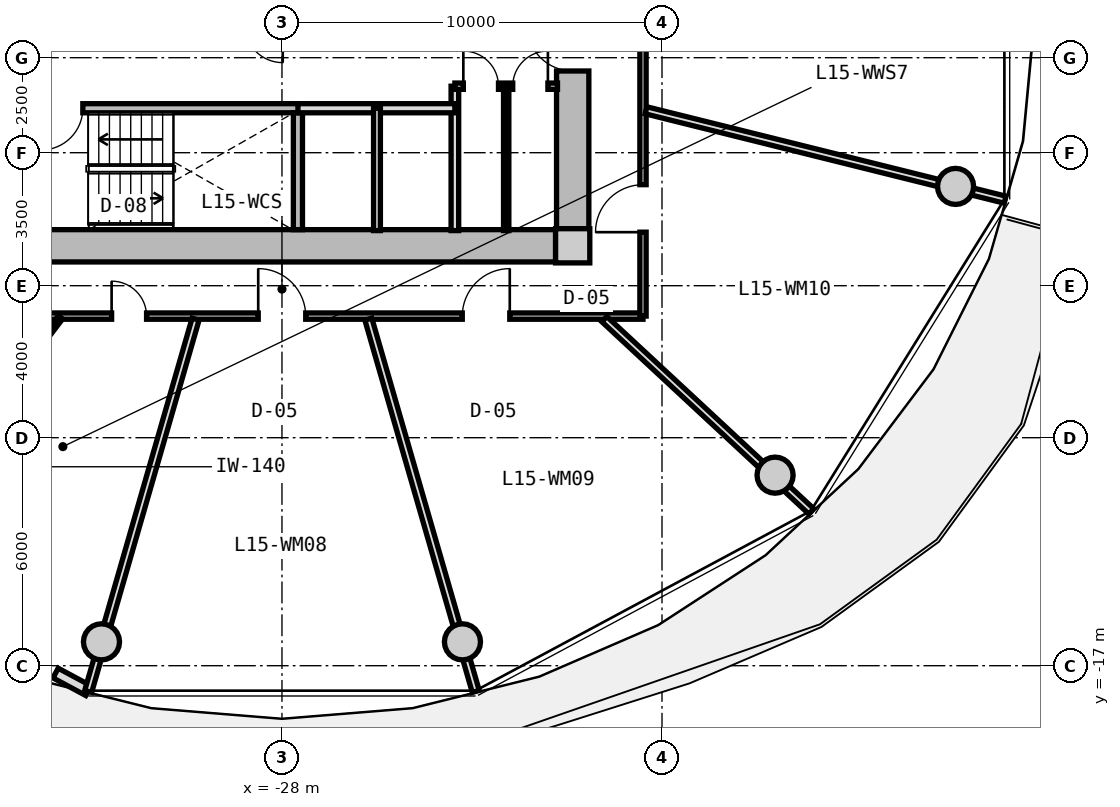
"""IFC4 building model, lengths in metres.
Left out: names, types, materials, properties, quantities, classifications, styles, units other than length and angle.
Written with IfcOpenShell. Run it as: python <this file> out.ifc"""

import sys

from ifc_helpers import new_model, si_unit, direction, frame, frame_2d, origin, origin_2d, place, context, subcontext, project, spatial, rectangle, circle, extrude, source, transform, mapped, element, fill, save


model = new_model("IFC4")
c1 = context("Model", 3, precision=1e-05, world=origin(), true_north=direction((0.0, 1.0)))
c2 = subcontext(c1, "Body", "Model", "MODEL_VIEW")
j1 = project(units=[si_unit("LENGTHUNIT", "METRE"), si_unit("PLANEANGLEUNIT", "RADIAN")], contexts=[c1])
p1 = place(None, origin())
s1 = spatial("IfcSite", under=j1, at=p1, CompositionType="ELEMENT")
p2 = place(p1, origin())
s2 = spatial("IfcBuilding", under=s1, at=p2, CompositionType="ELEMENT")
p3 = place(p2, frame((0.0, 0.0, 52.1)))
s3 = spatial("IfcBuildingStorey", under=s2, at=p3, CompositionType="ELEMENT", Elevation=52.1)
m1 = source(origin(), c2, "Body", "SweptSolid", [
    extrude(rectangle(XDim=0.9, YDim=0.9, at=origin_2d()), origin(), (0.0, 0.0, 1.0), 3.05),
])
p4 = place(p3, frame((-20.35, -5.95, 0.0), z_axis=(0.0, 0.0, 1.0), x_axis=(1.0, 0.0, 0.0)))
e1 = element("IfcColumn", 1, at=p4, inside=s3, PredefinedType="COLUMN", context=c2, shape_type="MappedRepresentation", body=[
    mapped(m1, transform((0.0, 0.0, 0.0), x_axis=(1.0, 0.0, 0.0), y_axis=(0.0, 1.0, 0.0), z_axis=(0.0, 0.0, 1.0), scale=1.0)),
])
m2 = source(origin(), c2, "Body", "SweptSolid", [
    extrude(rectangle(XDim=14.4, YDim=0.85, at=frame_2d((7.2, 0.0))), origin(), (0.0, 0.0, 1.0), 2.79),
])
p5 = place(p3, frame((-20.8, -5.95, 0.0), z_axis=(0.0, 0.0, 1.0), x_axis=(-1.0, 0.0, 0.0)))
e2 = element("IfcWall", 2, at=p5, inside=s3, PredefinedType="SHEAR", context=c2, shape_type="MappedRepresentation", body=[
    mapped(m2, transform((0.0, 0.0, 0.0), x_axis=(1.0, 0.0, 0.0), y_axis=(0.0, 1.0, 0.0), z_axis=(0.0, 0.0, 1.0), scale=1.0)),
])
m3 = source(origin(), c2, "Body", "SweptSolid", [
    extrude(rectangle(XDim=11.0, YDim=0.85, at=frame_2d((5.5, 0.0))), origin(), (0.0, 0.0, 1.0), 2.79),
])
p6 = place(p3, frame((-20.35, 5.5, 0.0), z_axis=(0.0, 0.0, 1.0), x_axis=(0.0, -1.0, 0.0)))
e3 = element("IfcWall", 3, at=p6, inside=s3, PredefinedType="SHEAR", context=c2, shape_type="MappedRepresentation", body=[
    mapped(m3, transform((0.0, 0.0, 0.0), x_axis=(1.0, 0.0, 0.0), y_axis=(0.0, 1.0, 0.0), z_axis=(0.0, 0.0, 1.0), scale=1.0)),
])
p7 = place(p6, frame((5.65, 0.0, 0.0)))
e4 = element("IfcOpeningElement", 4, at=p7, cuts=e3, PredefinedType="OPENING", context=c2, shape_type="SweptSolid", body=[
    extrude(rectangle(XDim=1.2, YDim=2.15, at=frame_2d((0.6, 1.075))), frame((0.0, 0.435, 0.0), z_axis=(0.0, -1.0, 0.0), x_axis=(1.0, 0.0, 0.0)), (0.0, 0.0, 1.0), 0.87),
])
m4 = source(origin(), c2, "Body", "SweptSolid", [
    extrude(circle(Radius=0.475, at=origin_2d()), origin(), (0.0, 0.0, 1.0), 3.05),
])
for number, where, z_axis, x_axis in (
    (5, (-32.749, -16.373, 0.0), (0.0, 0.0, 1.0), (1.0, 0.0, 0.0)),
    (6, (-23.251, -16.373, 0.0), (0.0, 0.0, 1.0), (1.0, 0.0, 0.0)),
    (7, (-15.025, -11.985, 0.0), (0.0, 0.0, 1.0), (1.0, 0.0, 0.0)),
    (8, (-10.275, -4.387, 0.0), (0.0, 0.0, 1.0), (1.0, 0.0, 0.0)),
):
    element("IfcColumn", number, at=place(p3, frame(where, z_axis=z_axis, x_axis=x_axis)), inside=s3, PredefinedType="COLUMN", context=c2, shape_type="MappedRepresentation", body=[
        mapped(m4, transform((0.0, 0.0, 0.0), x_axis=(1.0, 0.0, 0.0), y_axis=(0.0, 1.0, 0.0), z_axis=(0.0, 0.0, 1.0), scale=1.0)),
    ])
m5 = source(origin(), c2, "Body", "SweptSolid", [
    extrude(rectangle(XDim=10.011, YDim=0.29, at=frame_2d((5.005, 0.0))), origin(), (0.0, 0.0, 1.0), 2.79),
])
p8 = place(p3, frame((-33.094, -17.657, 0.0), z_axis=(0.0, 0.0, 1.0), x_axis=(-0.881272505317, 0.472608475773, 0.0)))
e9 = element("IfcWall", 9, at=p8, inside=s3, PredefinedType="SOLIDWALL", context=c2, shape_type="MappedRepresentation", body=[
    mapped(m5, transform((0.0, 0.0, 0.0), x_axis=(1.0, 0.0, 0.0), y_axis=(0.0, 1.0, 0.0), z_axis=(0.0, 0.0, 1.0), scale=1.0)),
])
p9 = place(p8, frame((0.98, 0.0, 0.0)))
e10 = element("IfcOpeningElement", 10, at=p9, cuts=e9, PredefinedType="OPENING", context=c2, shape_type="SweptSolid", body=[
    extrude(rectangle(XDim=1.15, YDim=2.25, at=frame_2d((0.575, 1.125))), frame((0.0, 0.155, 0.0), z_axis=(0.0, -1.0, 0.0), x_axis=(1.0, 0.0, 0.0)), (0.0, 0.0, 1.0), 0.31),
])
p10 = place(p8, frame((6.975, 0.0, 0.85)))
e11 = element("IfcOpeningElement", 11, at=p10, cuts=e9, PredefinedType="OPENING", context=c2, shape_type="SweptSolid", body=[
    extrude(rectangle(XDim=1.2, YDim=1.5, at=frame_2d((0.6, 0.75))), frame((0.0, 0.155, 0.0), z_axis=(0.0, -1.0, 0.0), x_axis=(1.0, 0.0, 0.0)), (0.0, 0.0, 1.0), 0.31),
])
m6 = source(origin(), c2, "Body", "SweptSolid", [
    extrude(rectangle(XDim=7.765, YDim=0.24, at=frame_2d((3.883, 0.0))), origin(), (0.0, 0.0, 1.0), 2.79),
])
p11 = place(p3, frame((-35.225, -2.33, 0.0), z_axis=(0.0, 0.0, 1.0), x_axis=(1.0, 0.0, 0.0)))
e12 = element("IfcWall", 12, at=p11, inside=s3, PredefinedType="PARTITIONING", context=c2, shape_type="MappedRepresentation", body=[
    mapped(m6, transform((0.0, 0.0, 0.0), x_axis=(1.0, 0.0, 0.0), y_axis=(0.0, 1.0, 0.0), z_axis=(0.0, 0.0, 1.0), scale=1.0)),
])
p12 = place(p11, frame((0.885, 0.0, 0.0)))
e13 = element("IfcOpeningElement", 13, at=p12, cuts=e12, PredefinedType="OPENING", context=c2, shape_type="SweptSolid", body=[
    extrude(rectangle(XDim=1.1, YDim=2.15, at=frame_2d((0.55, 1.075))), frame((0.0, 0.13, 0.0), z_axis=(0.0, -1.0, 0.0), x_axis=(1.0, 0.0, 0.0)), (0.0, 0.0, 1.0), 0.26),
])
m7 = source(origin(), c2, "Body", "SweptSolid", [
    extrude(rectangle(XDim=3.075, YDim=0.24, at=frame_2d((1.538, 0.0))), origin(), (0.0, 0.0, 1.0), 2.79),
])
p13 = place(p3, frame((-27.58, -5.525, 0.0), z_axis=(0.0, 0.0, 1.0), x_axis=(0.0, 1.0, 0.0)))
e14 = element("IfcWall", 14, at=p13, inside=s3, PredefinedType="PARTITIONING", context=c2, shape_type="MappedRepresentation", body=[
    mapped(m7, transform((0.0, 0.0, 0.0), x_axis=(1.0, 0.0, 0.0), y_axis=(0.0, 1.0, 0.0), z_axis=(0.0, 0.0, 1.0), scale=1.0)),
])
m8 = source(origin(), c2, "Body", "SweptSolid", [
    extrude(rectangle(XDim=3.8, YDim=0.2, at=frame_2d((1.9, 0.0))), origin(), (0.0, 0.0, 1.0), 2.775),
])
p14 = place(p3, frame((-23.45, -5.55, 0.0), z_axis=(0.0, 0.0, 1.0), x_axis=(0.0, 1.0, 0.0)))
e15 = element("IfcWall", 15, at=p14, inside=s3, PredefinedType="PARTITIONING", context=c2, shape_type="MappedRepresentation", body=[
    mapped(m8, transform((0.0, 0.0, 0.0), x_axis=(1.0, 0.0, 0.0), y_axis=(0.0, 1.0, 0.0), z_axis=(0.0, 0.0, 1.0), scale=1.0)),
])
m9 = source(origin(), c2, "Body", "SweptSolid", [
    extrude(rectangle(XDim=4.13, YDim=0.24, at=frame_2d((2.065, 0.0))), origin(), (0.0, 0.0, 1.0), 2.775),
])
p15 = place(p3, frame((-27.58, -2.33, 0.0), z_axis=(0.0, 0.0, 1.0), x_axis=(1.0, 0.0, 0.0)))
e16 = element("IfcWall", 16, at=p15, inside=s3, PredefinedType="PARTITIONING", context=c2, shape_type="MappedRepresentation", body=[
    mapped(m9, transform((0.0, 0.0, 0.0), x_axis=(1.0, 0.0, 0.0), y_axis=(0.0, 1.0, 0.0), z_axis=(0.0, 0.0, 1.0), scale=1.0)),
])
m10 = source(origin(), c2, "Body", "SweptSolid", [
    extrude(rectangle(XDim=3.22, YDim=0.18, at=frame_2d((1.61, 0.0))), origin(), (0.0, 0.0, 1.0), 2.775),
])
p16 = place(p3, frame((-25.5, -5.55, 0.0), z_axis=(0.0, 0.0, 1.0), x_axis=(0.0, 1.0, 0.0)))
e17 = element("IfcWall", 17, at=p16, inside=s3, PredefinedType="PARTITIONING", context=c2, shape_type="MappedRepresentation", body=[
    mapped(m10, transform((0.0, 0.0, 0.0), x_axis=(1.0, 0.0, 0.0), y_axis=(0.0, 1.0, 0.0), z_axis=(0.0, 0.0, 1.0), scale=1.0)),
])
m11 = source(origin(), c2, "Body", "SweptSolid", [
    extrude(rectangle(XDim=2.7, YDim=0.165, at=frame_2d((1.35, 0.0))), origin(), (0.0, 0.0, 1.0), 2.775),
])
p17 = place(p3, frame((-23.45, -1.75, 0.0), z_axis=(0.0, 0.0, 1.0), x_axis=(1.0, 0.0, 0.0)))
e18 = element("IfcWall", 18, at=p17, inside=s3, PredefinedType="PARTITIONING", context=c2, shape_type="MappedRepresentation", body=[
    mapped(m11, transform((0.0, 0.0, 0.0), x_axis=(1.0, 0.0, 0.0), y_axis=(0.0, 1.0, 0.0), z_axis=(0.0, 0.0, 1.0), scale=1.0)),
])
p18 = place(p17, frame((0.222, 0.0, 0.0)))
e19 = element("IfcOpeningElement", 19, at=p18, cuts=e18, PredefinedType="OPENING", context=c2, shape_type="SweptSolid", body=[
    extrude(rectangle(XDim=0.925, YDim=2.1, at=frame_2d((0.462, 1.05))), frame((0.0, 0.093, 0.0), z_axis=(0.0, -1.0, 0.0), x_axis=(1.0, 0.0, 0.0)), (0.0, 0.0, 1.0), 0.185),
])
p19 = place(p17, frame((1.522, 0.0, 0.0)))
e20 = element("IfcOpeningElement", 20, at=p19, cuts=e18, PredefinedType="OPENING", context=c2, shape_type="SweptSolid", body=[
    extrude(rectangle(XDim=0.925, YDim=2.1, at=frame_2d((0.462, 1.05))), frame((0.0, 0.093, 0.0), z_axis=(0.0, -1.0, 0.0), x_axis=(1.0, 0.0, 0.0)), (0.0, 0.0, 1.0), 0.185),
])
m12 = source(origin(), c2, "Body", "SweptSolid", [
    extrude(rectangle(XDim=3.8, YDim=0.14, at=frame_2d((1.9, 0.0))), origin(), (0.0, 0.0, 1.0), 2.775),
])
p20 = place(p3, frame((-22.1, -5.55, 0.0), z_axis=(0.0, 0.0, 1.0), x_axis=(0.0, 1.0, 0.0)))
e21 = element("IfcWall", 21, at=p20, inside=s3, PredefinedType="PARTITIONING", context=c2, shape_type="MappedRepresentation", body=[
    mapped(m12, transform((0.0, 0.0, 0.0), x_axis=(1.0, 0.0, 0.0), y_axis=(0.0, 1.0, 0.0), z_axis=(0.0, 0.0, 1.0), scale=1.0)),
])
m13 = source(origin(), c2, "Body", "SweptSolid", [
    extrude(rectangle(XDim=19.0, YDim=0.165, at=frame_2d((9.5, 0.0))), origin(), (0.0, 0.0, 1.0), 2.775),
])
p21 = place(p3, frame((-18.5, -7.8, 0.0), z_axis=(0.0, 0.0, 1.0), x_axis=(-1.0, 0.0, 0.0)))
e22 = element("IfcWall", 22, at=p21, inside=s3, PredefinedType="PARTITIONING", context=c2, shape_type="MappedRepresentation", body=[
    mapped(m13, transform((0.0, 0.0, 0.0), x_axis=(1.0, 0.0, 0.0), y_axis=(0.0, 1.0, 0.0), z_axis=(0.0, 0.0, 1.0), scale=1.0)),
])
p22 = place(p21, frame((16.214, 0.0, 0.0)))
e23 = element("IfcOpeningElement", 23, at=p22, cuts=e22, PredefinedType="OPENING", context=c2, shape_type="SweptSolid", body=[
    extrude(rectangle(XDim=0.92, YDim=2.1, at=frame_2d((0.46, 1.05))), frame((0.0, 0.093, 0.0), z_axis=(0.0, -1.0, 0.0), x_axis=(1.0, 0.0, 0.0)), (0.0, 0.0, 1.0), 0.185),
])
p23 = place(p21, frame((13.063, 0.0, 0.0)))
e24 = element("IfcOpeningElement", 24, at=p23, cuts=e22, PredefinedType="OPENING", context=c2, shape_type="SweptSolid", body=[
    extrude(rectangle(XDim=0.92, YDim=2.1, at=frame_2d((0.46, 1.05))), frame((0.0, 0.093, 0.0), z_axis=(0.0, -1.0, 0.0), x_axis=(1.0, 0.0, 0.0)), (0.0, 0.0, 1.0), 0.185),
])
p24 = place(p21, frame((8.875, 0.0, 0.0)))
e25 = element("IfcOpeningElement", 25, at=p24, cuts=e22, PredefinedType="OPENING", context=c2, shape_type="SweptSolid", body=[
    extrude(rectangle(XDim=1.25, YDim=2.2, at=frame_2d((0.625, 1.1))), frame((0.0, 0.093, 0.0), z_axis=(0.0, -1.0, 0.0), x_axis=(1.0, 0.0, 0.0)), (0.0, 0.0, 1.0), 0.185),
])
p25 = place(p21, frame((3.506, 0.0, 0.0)))
e26 = element("IfcOpeningElement", 26, at=p25, cuts=e22, PredefinedType="OPENING", context=c2, shape_type="SweptSolid", body=[
    extrude(rectangle(XDim=1.25, YDim=2.2, at=frame_2d((0.625, 1.1))), frame((0.0, 0.093, 0.0), z_axis=(0.0, -1.0, 0.0), x_axis=(1.0, 0.0, 0.0)), (0.0, 0.0, 1.0), 0.185),
])
m14 = source(origin(), c2, "Body", "SweptSolid", [
    extrude(rectangle(XDim=15.6, YDim=0.165, at=frame_2d((7.8, 0.0))), origin(), (0.0, 0.0, 1.0), 2.775),
])
p26 = place(p3, frame((-18.5, 7.8, 0.0), z_axis=(0.0, 0.0, 1.0), x_axis=(0.0, -1.0, 0.0)))
e27 = element("IfcWall", 27, at=p26, inside=s3, PredefinedType="PARTITIONING", context=c2, shape_type="MappedRepresentation", body=[
    mapped(m14, transform((0.0, 0.0, 0.0), x_axis=(1.0, 0.0, 0.0), y_axis=(0.0, 1.0, 0.0), z_axis=(0.0, 0.0, 1.0), scale=1.0)),
])
p27 = place(p26, frame((12.141, 0.0, 0.0)))
e28 = element("IfcOpeningElement", 28, at=p27, cuts=e27, PredefinedType="OPENING", context=c2, shape_type="SweptSolid", body=[
    extrude(rectangle(XDim=1.25, YDim=2.2, at=frame_2d((0.625, 1.1))), frame((0.0, 0.093, 0.0), z_axis=(0.0, -1.0, 0.0), x_axis=(1.0, 0.0, 0.0)), (0.0, 0.0, 1.0), 0.185),
])
p28 = place(p26, frame((7.175, 0.0, 0.0)))
e29 = element("IfcOpeningElement", 29, at=p28, cuts=e27, PredefinedType="OPENING", context=c2, shape_type="SweptSolid", body=[
    extrude(rectangle(XDim=1.25, YDim=2.2, at=frame_2d((0.625, 1.1))), frame((0.0, 0.093, 0.0), z_axis=(0.0, -1.0, 0.0), x_axis=(1.0, 0.0, 0.0)), (0.0, 0.0, 1.0), 0.185),
])
p29 = place(p26, frame((2.826, 0.0, 0.0)))
e30 = element("IfcOpeningElement", 30, at=p29, cuts=e27, PredefinedType="OPENING", context=c2, shape_type="SweptSolid", body=[
    extrude(rectangle(XDim=1.05, YDim=2.15, at=frame_2d((0.525, 1.075))), frame((0.0, 0.093, 0.0), z_axis=(0.0, -1.0, 0.0), x_axis=(1.0, 0.0, 0.0)), (0.0, 0.0, 1.0), 0.185),
])
p30 = place(p26, frame((0.881, 0.0, 0.0)))
e31 = element("IfcOpeningElement", 31, at=p30, cuts=e27, PredefinedType="OPENING", context=c2, shape_type="SweptSolid", body=[
    extrude(rectangle(XDim=1.05, YDim=2.15, at=frame_2d((0.525, 1.075))), frame((0.0, 0.093, 0.0), z_axis=(0.0, -1.0, 0.0), x_axis=(1.0, 0.0, 0.0)), (0.0, 0.0, 1.0), 0.185),
])
m15 = source(origin(), c2, "Body", "SweptSolid", [
    extrude(rectangle(XDim=10.196, YDim=0.19, at=frame_2d((5.098, 0.0))), origin(), (0.0, 0.0, 1.0), 2.225),
])
p31 = place(p3, frame((-30.273, -7.88, 0.0), z_axis=(0.0, 0.0, 1.0), x_axis=(-0.277136420347, -0.960830580549, 0.0)))
e32 = element("IfcWall", 32, at=p31, inside=s3, PredefinedType="PARTITIONING", context=c2, shape_type="MappedRepresentation", body=[
    mapped(m15, transform((0.0, 0.0, 0.0), x_axis=(1.0, 0.0, 0.0), y_axis=(0.0, 1.0, 0.0), z_axis=(0.0, 0.0, 1.0), scale=1.0)),
])
m16 = source(origin(), c2, "Body", "SweptSolid", [
    extrude(rectangle(XDim=8.436, YDim=0.14, at=frame_2d((4.218, 0.0))), origin(), (0.0, 0.0, 1.0), 2.775),
])
p32 = place(p3, frame((-33.828, -7.83, 0.0), z_axis=(0.0, 0.0, 1.0), x_axis=(-0.604486552388, -0.796615345058, 0.0)))
e33 = element("IfcWall", 33, at=p32, inside=s3, PredefinedType="PARTITIONING", context=c2, shape_type="MappedRepresentation", body=[
    mapped(m16, transform((0.0, 0.0, 0.0), x_axis=(1.0, 0.0, 0.0), y_axis=(0.0, 1.0, 0.0), z_axis=(0.0, 0.0, 1.0), scale=1.0)),
])
p33 = place(p3, frame((-25.727, -7.88, 0.0), z_axis=(0.0, 0.0, 1.0), x_axis=(0.277136420347, -0.960830580549, 0.0)))
e34 = element("IfcWall", 34, at=p33, inside=s3, PredefinedType="PARTITIONING", context=c2, shape_type="MappedRepresentation", body=[
    mapped(m15, transform((0.0, 0.0, 0.0), x_axis=(1.0, 0.0, 0.0), y_axis=(0.0, 1.0, 0.0), z_axis=(0.0, 0.0, 1.0), scale=1.0)),
])
m17 = source(origin(), c2, "Body", "SweptSolid", [
    extrude(rectangle(XDim=7.435, YDim=0.19, at=frame_2d((3.717, 0.0))), origin(), (0.0, 0.0, 1.0), 2.225),
])
p34 = place(p3, frame((-19.517, -7.88, 0.0), z_axis=(0.0, 0.0, 1.0), x_axis=(0.732651956848, -0.680603489652, 0.0)))
e35 = element("IfcWall", 35, at=p34, inside=s3, PredefinedType="PARTITIONING", context=c2, shape_type="MappedRepresentation", body=[
    mapped(m17, transform((0.0, 0.0, 0.0), x_axis=(1.0, 0.0, 0.0), y_axis=(0.0, 1.0, 0.0), z_axis=(0.0, 0.0, 1.0), scale=1.0)),
])
m18 = source(origin(), c2, "Body", "SweptSolid", [
    extrude(rectangle(XDim=9.737, YDim=0.19, at=frame_2d((4.869, 0.0))), origin(), (0.0, 0.0, 1.0), 2.225),
])
p35 = place(p3, frame((-18.42, -2.385, 0.0), z_axis=(0.0, 0.0, 1.0), x_axis=(0.970392716238, -0.241532557375, 0.0)))
e36 = element("IfcWall", 36, at=p35, inside=s3, PredefinedType="PARTITIONING", context=c2, shape_type="MappedRepresentation", body=[
    mapped(m18, transform((0.0, 0.0, 0.0), x_axis=(1.0, 0.0, 0.0), y_axis=(0.0, 1.0, 0.0), z_axis=(0.0, 0.0, 1.0), scale=1.0)),
])
m19 = source(origin(), c2, "Body", "SweptSolid", [
    extrude(rectangle(XDim=1.15, YDim=2.25, at=frame_2d((0.575, 1.125))), frame((0.0, 0.025, 0.0), z_axis=(0.0, -1.0, 0.0), x_axis=(1.0, 0.0, 0.0)), (0.0, 0.0, 1.0), 0.05),
])
p36 = place(p9, origin())
e37 = element("IfcDoor", 37, at=p36, inside=s3, OperationType="SINGLE_SWING_RIGHT", PredefinedType="DOOR", context=c2, shape_type="MappedRepresentation", body=[
    mapped(m19, transform((0.0, 0.0, 0.0), x_axis=(1.0, 0.0, 0.0), y_axis=(0.0, 1.0, 0.0), z_axis=(0.0, 0.0, 1.0), scale=1.0)),
])
fill(e10, e37)
m20 = source(origin(), c2, "Body", "SweptSolid", [
    extrude(rectangle(XDim=1.1, YDim=2.15, at=frame_2d((0.55, 1.075))), frame((0.0, 0.025, 0.0), z_axis=(0.0, -1.0, 0.0), x_axis=(1.0, 0.0, 0.0)), (0.0, 0.0, 1.0), 0.05),
])
p37 = place(p12, frame((1.1, 0.0, 0.0), z_axis=(0.0, 0.0, 1.0), x_axis=(-1.0, 0.0, 0.0)))
e38 = element("IfcDoor", 38, at=p37, inside=s3, OperationType="SINGLE_SWING_RIGHT", PredefinedType="DOOR", context=c2, shape_type="MappedRepresentation", body=[
    mapped(m20, transform((0.0, 0.0, 0.0), x_axis=(1.0, 0.0, 0.0), y_axis=(0.0, 1.0, 0.0), z_axis=(0.0, 0.0, 1.0), scale=1.0)),
])
fill(e13, e38)
m21 = source(origin(), c2, "Body", "SweptSolid", [
    extrude(rectangle(XDim=1.2, YDim=2.15, at=frame_2d((0.6, 1.075))), frame((0.0, 0.025, 0.0), z_axis=(0.0, -1.0, 0.0), x_axis=(1.0, 0.0, 0.0)), (0.0, 0.0, 1.0), 0.05),
])
p38 = place(p7, frame((1.2, 0.0, 0.0), z_axis=(0.0, 0.0, 1.0), x_axis=(-1.0, 0.0, 0.0)))
e39 = element("IfcDoor", 39, at=p38, inside=s3, OperationType="SINGLE_SWING_RIGHT", PredefinedType="DOOR", context=c2, shape_type="MappedRepresentation", body=[
    mapped(m21, transform((0.0, 0.0, 0.0), x_axis=(1.0, 0.0, 0.0), y_axis=(0.0, 1.0, 0.0), z_axis=(0.0, 0.0, 1.0), scale=1.0)),
])
fill(e4, e39)
m22 = source(origin(), c2, "Body", "SweptSolid", [
    extrude(rectangle(XDim=0.925, YDim=2.1, at=frame_2d((0.462, 1.05))), frame((0.0, 0.025, 0.0), z_axis=(0.0, -1.0, 0.0), x_axis=(1.0, 0.0, 0.0)), (0.0, 0.0, 1.0), 0.05),
])
p39 = place(p18, origin())
e40 = element("IfcDoor", 40, at=p39, inside=s3, OperationType="SINGLE_SWING_LEFT", PredefinedType="DOOR", context=c2, shape_type="MappedRepresentation", body=[
    mapped(m22, transform((0.0, 0.0, 0.0), x_axis=(1.0, 0.0, 0.0), y_axis=(0.0, 1.0, 0.0), z_axis=(0.0, 0.0, 1.0), scale=1.0)),
])
fill(e19, e40)
p40 = place(p19, origin())
e41 = element("IfcDoor", 41, at=p40, inside=s3, OperationType="SINGLE_SWING_RIGHT", PredefinedType="DOOR", context=c2, shape_type="MappedRepresentation", body=[
    mapped(m22, transform((0.0, 0.0, 0.0), x_axis=(1.0, 0.0, 0.0), y_axis=(0.0, 1.0, 0.0), z_axis=(0.0, 0.0, 1.0), scale=1.0)),
])
fill(e20, e41)
m23 = source(origin(), c2, "Body", "SweptSolid", [
    extrude(rectangle(XDim=0.92, YDim=2.1, at=frame_2d((0.46, 1.05))), frame((0.0, 0.025, 0.0), z_axis=(0.0, -1.0, 0.0), x_axis=(1.0, 0.0, 0.0)), (0.0, 0.0, 1.0), 0.05),
])
p41 = place(p23, frame((0.92, 0.0, 0.0), z_axis=(0.0, 0.0, 1.0), x_axis=(-1.0, 0.0, 0.0)))
e42 = element("IfcDoor", 42, at=p41, inside=s3, OperationType="SINGLE_SWING_LEFT", PredefinedType="DOOR", context=c2, shape_type="MappedRepresentation", body=[
    mapped(m23, transform((0.0, 0.0, 0.0), x_axis=(1.0, 0.0, 0.0), y_axis=(0.0, 1.0, 0.0), z_axis=(0.0, 0.0, 1.0), scale=1.0)),
])
fill(e24, e42)
m24 = source(origin(), c2, "Body", "SweptSolid", [
    extrude(rectangle(XDim=1.25, YDim=2.2, at=frame_2d((0.625, 1.1))), frame((0.0, 0.025, 0.0), z_axis=(0.0, -1.0, 0.0), x_axis=(1.0, 0.0, 0.0)), (0.0, 0.0, 1.0), 0.05),
])
p42 = place(p24, frame((1.25, 0.0, 0.0), z_axis=(0.0, 0.0, 1.0), x_axis=(-1.0, 0.0, 0.0)))
e43 = element("IfcDoor", 43, at=p42, inside=s3, OperationType="SINGLE_SWING_LEFT", PredefinedType="DOOR", context=c2, shape_type="MappedRepresentation", body=[
    mapped(m24, transform((0.0, 0.0, 0.0), x_axis=(1.0, 0.0, 0.0), y_axis=(0.0, 1.0, 0.0), z_axis=(0.0, 0.0, 1.0), scale=1.0)),
])
fill(e25, e43)
p43 = place(p25, frame((1.25, 0.0, 0.0), z_axis=(0.0, 0.0, 1.0), x_axis=(-1.0, 0.0, 0.0)))
e44 = element("IfcDoor", 44, at=p43, inside=s3, OperationType="SINGLE_SWING_RIGHT", PredefinedType="DOOR", context=c2, shape_type="MappedRepresentation", body=[
    mapped(m24, transform((0.0, 0.0, 0.0), x_axis=(1.0, 0.0, 0.0), y_axis=(0.0, 1.0, 0.0), z_axis=(0.0, 0.0, 1.0), scale=1.0)),
])
fill(e26, e44)
p44 = place(p27, frame((1.25, 0.0, 0.0), z_axis=(0.0, 0.0, 1.0), x_axis=(-1.0, 0.0, 0.0)))
e45 = element("IfcDoor", 45, at=p44, inside=s3, OperationType="SINGLE_SWING_LEFT", PredefinedType="DOOR", context=c2, shape_type="MappedRepresentation", body=[
    mapped(m24, transform((0.0, 0.0, 0.0), x_axis=(1.0, 0.0, 0.0), y_axis=(0.0, 1.0, 0.0), z_axis=(0.0, 0.0, 1.0), scale=1.0)),
])
fill(e28, e45)
save(model, sys.argv[1])
